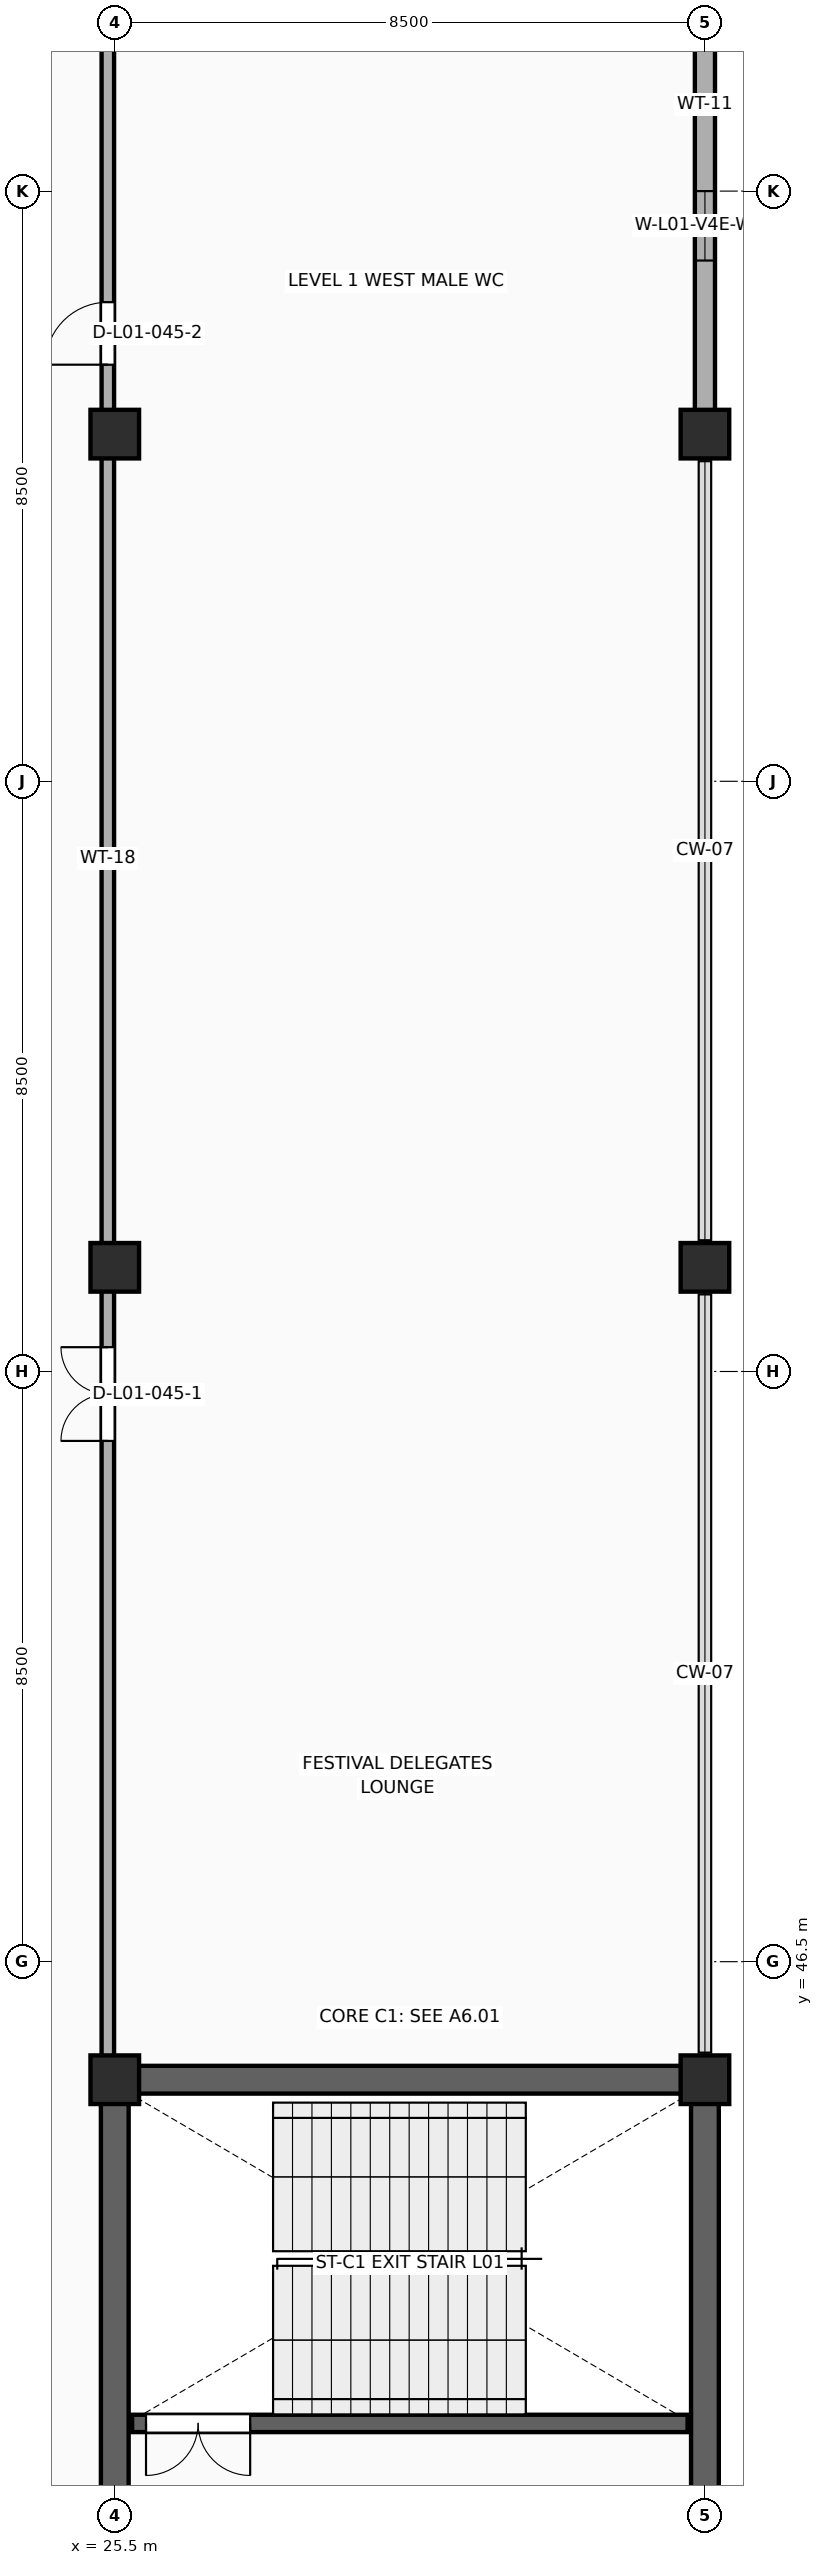
"""IFC4 building model, lengths in metres.
Left out: names, types, materials, properties, quantities, classifications, styles, units other than length and angle.
Written with IfcOpenShell. Run it as: python <this file> out.ifc"""

import sys

from ifc_helpers import new_model, si_unit, direction, frame, frame_2d, origin, origin_2d, place, context, subcontext, project, spatial, rectangle, extrude, element, fill, save


model = new_model("IFC4")
c1 = context("Model", 3, precision=1e-05, world=origin(), true_north=direction((0.0, 1.0)))
c2 = subcontext(c1, "Body", "Model", "MODEL_VIEW")
j1 = project(units=[si_unit("LENGTHUNIT", "METRE"), si_unit("PLANEANGLEUNIT", "RADIAN")], contexts=[c1])
p1 = place(None, origin())
s1 = spatial("IfcSite", under=j1, at=p1, CompositionType="ELEMENT")
p2 = place(p1, origin())
s2 = spatial("IfcBuilding", under=s1, at=p2, CompositionType="ELEMENT")
p3 = place(p2, frame((0.0, 0.0, 5.4)))
s3 = spatial("IfcBuildingStorey", under=s2, at=p3, CompositionType="ELEMENT", Elevation=5.4)
p4 = place(p3, frame((25.5, 32.0, 0.0), z_axis=(0.0, 0.0, 1.0), x_axis=(0.0, 1.0, 0.0)))
e1 = element("IfcWall", 1, at=p4, inside=s3, PredefinedType="SHEAR", context=c2, shape_type="SweptSolid", body=[
    extrude(rectangle(XDim=12.8, YDim=0.4, at=frame_2d((6.4, 0.0))), origin(), (0.0, 0.0, 1.0), 4.64),
])
p5 = place(p4, frame((1.25, 0.0, 0.0)))
e2 = element("IfcOpeningElement", 2, at=p5, cuts=e1, PredefinedType="OPENING", context=c2, shape_type="SweptSolid", body=[
    extrude(rectangle(XDim=1.05, YDim=2.15, at=frame_2d((0.525, 1.075))), frame((0.0, 0.212, 0.0), z_axis=(0.0, -1.0, 0.0), x_axis=(1.0, 0.0, 0.0)), (0.0, 0.0, 1.0), 0.424),
])
p6 = place(p3, frame((34.0, 32.0, 0.0), z_axis=(0.0, 0.0, 1.0), x_axis=(0.0, 1.0, 0.0)))
e3 = element("IfcWall", 3, at=p6, inside=s3, PredefinedType="SHEAR", context=c2, shape_type="SweptSolid", body=[
    extrude(rectangle(XDim=12.8, YDim=0.4, at=frame_2d((6.4, 0.0))), origin(), (0.0, 0.0, 1.0), 4.64),
])
p7 = place(p3, frame((25.7, 44.8, 0.0), z_axis=(0.0, 0.0, 1.0), x_axis=(1.0, 0.0, 0.0)))
e4 = element("IfcWall", 4, at=p7, inside=s3, PredefinedType="SHEAR", context=c2, shape_type="SweptSolid", body=[
    extrude(rectangle(XDim=8.1, YDim=0.4, at=frame_2d((4.05, 0.0))), origin(), (0.0, 0.0, 1.0), 4.64),
])
p8 = place(p3, frame((25.75, 39.85, 0.0), z_axis=(0.0, 0.0, 1.0), x_axis=(1.0, 0.0, 0.0)))
e5 = element("IfcWall", 5, at=p8, inside=s3, PredefinedType="STANDARD", context=c2, shape_type="SweptSolid", body=[
    extrude(rectangle(XDim=8.0, YDim=0.25, at=frame_2d((4.0, 0.0))), origin(), (0.0, 0.0, 1.0), 4.64),
])
p9 = place(p8, frame((0.2, 0.0, 0.0)))
e6 = element("IfcOpeningElement", 6, at=p9, cuts=e5, PredefinedType="OPENING", context=c2, shape_type="SweptSolid", body=[
    extrude(rectangle(XDim=1.5, YDim=2.2, at=frame_2d((0.75, 1.1))), frame((0.0, 0.137, 0.0), z_axis=(0.0, -1.0, 0.0), x_axis=(1.0, 0.0, 0.0)), (0.0, 0.0, 1.0), 0.274),
])
for number, where, z_axis, x_axis in (
    (7, (25.5, 44.8, 0.0), (0.0, 0.0, 1.0), (1.0, 0.0, 0.0)),
    (8, (25.5, 56.5, 0.0), (0.0, 0.0, 1.0), (1.0, 0.0, 0.0)),
    (9, (25.5, 68.5, 0.0), (0.0, 0.0, 1.0), (1.0, 0.0, 0.0)),
    (10, (34.0, 44.8, 0.0), (0.0, 0.0, 1.0), (1.0, 0.0, 0.0)),
    (11, (34.0, 56.5, 0.0), (0.0, 0.0, 1.0), (1.0, 0.0, 0.0)),
    (12, (34.0, 68.5, 0.0), (0.0, 0.0, 1.0), (1.0, 0.0, 0.0)),
):
    element("IfcColumn", number, at=place(p3, frame(where, z_axis=z_axis, x_axis=x_axis)), inside=s3, PredefinedType="COLUMN", context=c2, shape_type="SweptSolid", body=[
        extrude(rectangle(XDim=0.7, YDim=0.7, at=origin_2d()), origin(), (0.0, 0.0, 1.0), 4.54),
    ])
p10 = place(p3, frame((34.0, 68.5, 0.0), z_axis=(0.0, 0.0, 1.0), x_axis=(0.0, 1.0, 0.0)))
e13 = element("IfcWall", 13, at=p10, inside=s3, PredefinedType="STANDARD", context=c2, shape_type="SweptSolid", body=[
    extrude(rectangle(XDim=12.0, YDim=0.29, at=frame_2d((6.0, 0.0))), origin(), (0.0, 0.0, 1.0), 4.178),
])
p11 = place(p10, frame((2.5, 0.0, 1.1)))
e14 = element("IfcOpeningElement", 14, at=p11, cuts=e13, PredefinedType="OPENING", context=c2, shape_type="SweptSolid", body=[
    extrude(rectangle(XDim=1.0, YDim=1.5, at=frame_2d((0.5, 0.75))), frame((0.0, 0.157, 0.0), z_axis=(0.0, -1.0, 0.0), x_axis=(1.0, 0.0, 0.0)), (0.0, 0.0, 1.0), 0.314),
])
p12 = place(p3, frame((25.4, 45.0, 0.0), z_axis=(0.0, 0.0, 1.0), x_axis=(0.0, 1.0, 0.0)))
e15 = element("IfcWall", 15, at=p12, inside=s3, PredefinedType="PARTITIONING", context=c2, shape_type="SweptSolid", body=[
    extrude(rectangle(XDim=35.2, YDim=0.18, at=frame_2d((17.6, 0.0))), origin(), (0.0, 0.0, 1.0), 3.728),
])
p13 = place(p12, frame((9.0, 0.0, 0.0)))
e16 = element("IfcOpeningElement", 16, at=p13, cuts=e15, PredefinedType="OPENING", context=c2, shape_type="SweptSolid", body=[
    extrude(rectangle(XDim=1.35, YDim=2.25, at=frame_2d((0.675, 1.125))), frame((0.0, 0.102, 0.0), z_axis=(0.0, -1.0, 0.0), x_axis=(1.0, 0.0, 0.0)), (0.0, 0.0, 1.0), 0.204),
])
p14 = place(p12, frame((24.5, 0.0, 0.0)))
e17 = element("IfcOpeningElement", 17, at=p14, cuts=e15, PredefinedType="OPENING", context=c2, shape_type="SweptSolid", body=[
    extrude(rectangle(XDim=0.9, YDim=2.15, at=frame_2d((0.45, 1.075))), frame((0.0, 0.102, 0.0), z_axis=(0.0, -1.0, 0.0), x_axis=(1.0, 0.0, 0.0)), (0.0, 0.0, 1.0), 0.204),
])
p15 = place(p12, frame((29.5, 0.0, 0.0)))
e18 = element("IfcOpeningElement", 18, at=p15, cuts=e15, PredefinedType="OPENING", context=c2, shape_type="SweptSolid", body=[
    extrude(rectangle(XDim=0.9, YDim=2.15, at=frame_2d((0.45, 1.075))), frame((0.0, 0.102, 0.0), z_axis=(0.0, -1.0, 0.0), x_axis=(1.0, 0.0, 0.0)), (0.0, 0.0, 1.0), 0.204),
])
p16 = place(p12, frame((33.4, 0.0, 0.0)))
e19 = element("IfcOpeningElement", 19, at=p16, cuts=e15, PredefinedType="OPENING", context=c2, shape_type="SweptSolid", body=[
    extrude(rectangle(XDim=0.95, YDim=2.15, at=frame_2d((0.475, 1.075))), frame((0.0, 0.102, 0.0), z_axis=(0.0, -1.0, 0.0), x_axis=(1.0, 0.0, 0.0)), (0.0, 0.0, 1.0), 0.204),
])
p17 = place(p9, frame((1.5, 0.0, 0.0), z_axis=(0.0, 0.0, 1.0), x_axis=(-1.0, 0.0, 0.0)))
e20 = element("IfcDoor", 20, at=p17, inside=s3, OperationType="DOUBLE_DOOR_SINGLE_SWING", PredefinedType="DOOR", context=c2, shape_type="SweptSolid", body=[
    extrude(rectangle(XDim=1.5, YDim=2.2, at=frame_2d((0.75, 1.1))), frame((0.0, 0.025, 0.0), z_axis=(0.0, -1.0, 0.0), x_axis=(1.0, 0.0, 0.0)), (0.0, 0.0, 1.0), 0.05),
])
fill(e6, e20)
p18 = place(p11, origin())
e21 = element("IfcWindow", 21, at=p18, inside=s3, PartitioningType="SINGLE_PANEL", PredefinedType="WINDOW", context=c2, shape_type="SweptSolid", body=[
    extrude(rectangle(XDim=1.0, YDim=1.5, at=frame_2d((0.5, 0.75))), frame((0.0, 0.03, 0.0), z_axis=(0.0, -1.0, 0.0), x_axis=(1.0, 0.0, 0.0)), (0.0, 0.0, 1.0), 0.06),
])
fill(e14, e21)
p19 = place(p13, origin())
e22 = element("IfcDoor", 22, at=p19, inside=s3, OperationType="DOUBLE_DOOR_SINGLE_SWING", PredefinedType="DOOR", context=c2, shape_type="SweptSolid", body=[
    extrude(rectangle(XDim=1.35, YDim=2.25, at=frame_2d((0.675, 1.125))), frame((0.0, 0.025, 0.0), z_axis=(0.0, -1.0, 0.0), x_axis=(1.0, 0.0, 0.0)), (0.0, 0.0, 1.0), 0.05),
])
fill(e16, e22)
p20 = place(p14, origin())
e23 = element("IfcDoor", 23, at=p20, inside=s3, OperationType="SINGLE_SWING_LEFT", PredefinedType="DOOR", context=c2, shape_type="SweptSolid", body=[
    extrude(rectangle(XDim=0.9, YDim=2.15, at=frame_2d((0.45, 1.075))), frame((0.0, 0.025, 0.0), z_axis=(0.0, -1.0, 0.0), x_axis=(1.0, 0.0, 0.0)), (0.0, 0.0, 1.0), 0.05),
])
fill(e17, e23)
save(model, sys.argv[1])
